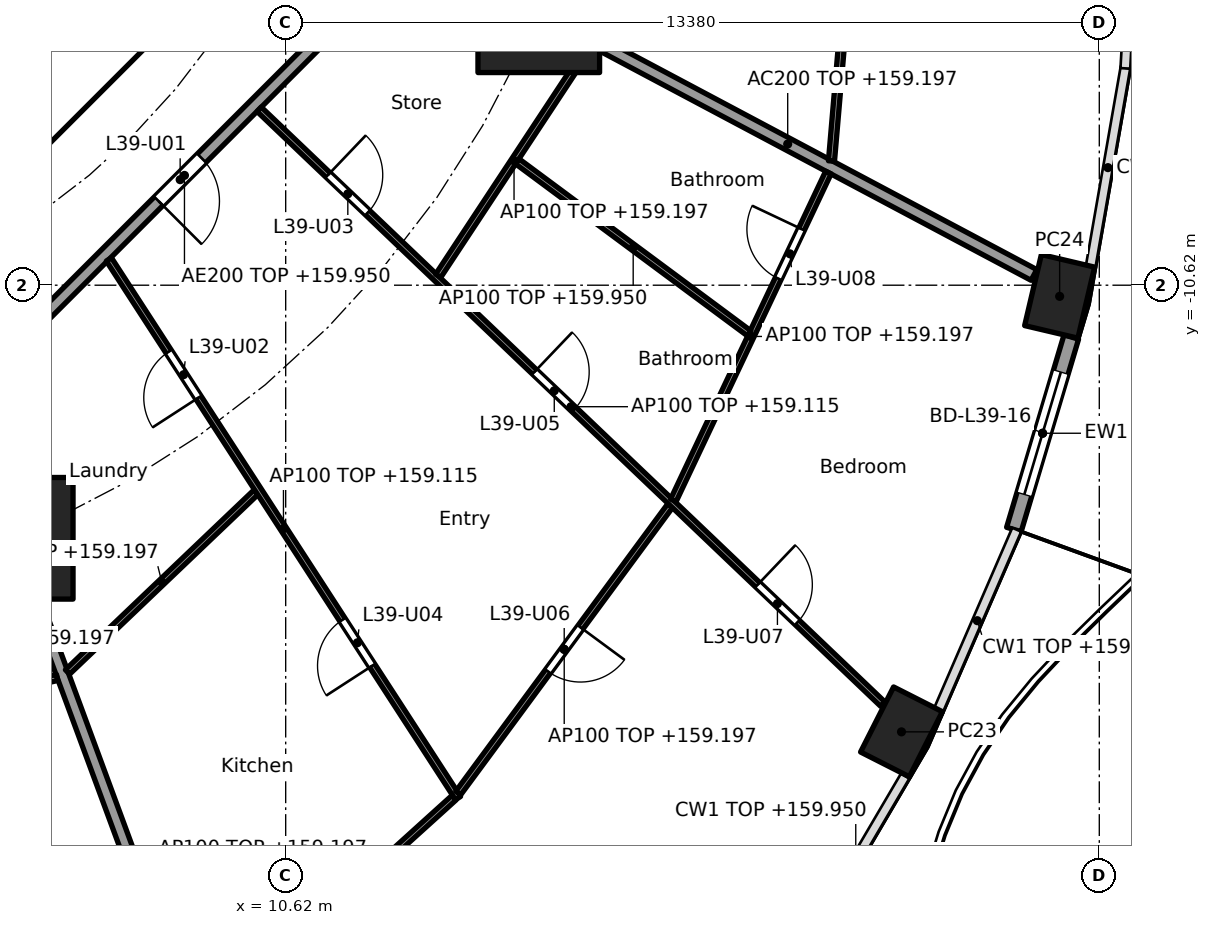
"""IFC4 building model, lengths in metres.
Left out: names, types, materials, properties, quantities, classifications, styles, units other than length and angle.
Written with IfcOpenShell. Run it as: python <this file> out.ifc"""

import sys

from ifc_helpers import new_model, si_unit, direction, frame, frame_2d, origin, origin_2d, place, context, subcontext, project, spatial, rectangle, hollow_rectangle, extrude, element, fill, save


model = new_model("IFC4")
c1 = context("Model", 3, precision=1e-05, world=origin(), true_north=direction((0.0, 1.0)))
c2 = subcontext(c1, "Body", "Model", "MODEL_VIEW")
j1 = project(units=[si_unit("LENGTHUNIT", "METRE"), si_unit("PLANEANGLEUNIT", "RADIAN")], contexts=[c1])
p1 = place(None, origin())
s1 = spatial("IfcSite", under=j1, at=p1, CompositionType="ELEMENT")
p2 = place(p1, origin())
s2 = spatial("IfcBuilding", under=s1, at=p2, CompositionType="ELEMENT")
p3 = place(p2, frame((0.0, 0.0, 156.6)))
s3 = spatial("IfcBuildingStorey", under=s2, at=p3, CompositionType="ELEMENT", Elevation=156.6)
for number, where, z_axis, x_axis in (
    (1, (20.747, -17.965, 0.0), (0.0, 0.0, 1.0), (0.452, 0.892, 0.0)),
    (2, (23.348, -10.803, 0.0), (0.0, 0.0, 1.0), (0.229, 0.973, 0.0)),
):
    element("IfcColumn", number, at=place(p3, frame(where, z_axis=z_axis, x_axis=x_axis)), inside=s3, PredefinedType="COLUMN", context=c2, shape_type="SweptSolid", body=[
        extrude(hollow_rectangle(XDim=1.2, YDim=0.9, WallThickness=0.04, at=origin_2d()), origin(), (0.0, 0.0, 1.0), 3.7),
    ])
for number, where, z_axis, x_axis in (
    (3, (6.123, -14.782, 0.0), (0.0, 0.0, 1.0), (1.0, 0.0, 0.0)),
    (4, (14.782, -6.123, 0.0), (0.0, 0.0, 1.0), (1.0, 0.0, 0.0)),
):
    element("IfcColumn", number, at=place(p3, frame(where, z_axis=z_axis, x_axis=x_axis)), inside=s3, PredefinedType="COLUMN", context=c2, shape_type="SweptSolid", body=[
        extrude(rectangle(XDim=2.0, YDim=2.0, at=origin_2d()), origin(), (0.0, 0.0, 1.0), 3.7),
    ])
p4 = place(p3, frame((23.54, -11.472, 0.0), z_axis=(0.0, 0.0, 1.0), x_axis=(-0.285821792767, -0.958282788523, 0.0)))
e5 = element("IfcWall", 5, at=p4, inside=s3, PredefinedType="SOLIDWALL", context=c2, shape_type="SweptSolid", body=[
    extrude(rectangle(XDim=3.303, YDim=0.25, at=frame_2d((1.651, 0.0))), origin(), (0.0, 0.0, 1.0), 3.35),
])
p5 = place(p4, frame((0.602, 0.0, 0.0)))
e6 = element("IfcOpeningElement", 6, at=p5, cuts=e5, PredefinedType="OPENING", context=c2, shape_type="SweptSolid", body=[
    extrude(rectangle(XDim=2.1, YDim=2.4, at=frame_2d((1.05, 1.2))), frame((0.0, 0.135, 0.0), z_axis=(0.0, -1.0, 0.0), x_axis=(1.0, 0.0, 0.0)), (0.0, 0.0, 1.0), 0.27),
])
p6 = place(p3, frame((4.613, -9.988, 0.0), z_axis=(0.0, 0.0, 1.0), x_axis=(0.707106781187, 0.707106781187, 0.0)))
e7 = element("IfcWall", 7, at=p6, inside=s3, PredefinedType="SHEAR", context=c2, shape_type="SweptSolid", body=[
    extrude(rectangle(XDim=7.602, YDim=0.6, at=frame_2d((3.801, 0.0))), origin(), (0.0, 0.0, 1.0), 3.35),
])
p7 = place(p6, frame((3.201, 0.0, 0.0)))
e8 = element("IfcOpeningElement", 8, at=p7, cuts=e7, PredefinedType="OPENING", context=c2, shape_type="SweptSolid", body=[
    extrude(rectangle(XDim=1.2, YDim=2.1, at=frame_2d((0.6, 1.05))), frame((0.0, 0.31, 0.0), z_axis=(0.0, -1.0, 0.0), x_axis=(1.0, 0.0, 0.0)), (0.0, 0.0, 1.0), 0.62),
])
p8 = place(p3, frame((6.14, -14.829, 0.0), z_axis=(0.0, 0.0, 1.0), x_axis=(0.346169582481, -0.938171956608, 0.0)))
e9 = element("IfcWall", 9, at=p8, inside=s3, PredefinedType="PARTITIONING", context=c2, shape_type="SweptSolid", body=[
    extrude(rectangle(XDim=14.354, YDim=0.2, at=frame_2d((7.177, 0.0))), origin(), (0.0, 0.0, 1.0), 2.597),
])
p9 = place(p3, frame((14.826, -6.146, 0.0), z_axis=(0.0, 0.0, 1.0), x_axis=(0.883012998471, -0.469348532044, 0.0)))
e10 = element("IfcWall", 10, at=p9, inside=s3, PredefinedType="PARTITIONING", context=c2, shape_type="SweptSolid", body=[
    extrude(rectangle(XDim=9.172, YDim=0.2, at=frame_2d((4.586, 0.0))), origin(), (0.0, 0.0, 1.0), 2.597),
])
p10 = place(p3, frame((5.275, -12.494, 0.0), z_axis=(0.0, 0.0, 1.0), x_axis=(0.707106781187, 0.707106781187, 0.0)))
e11 = element("IfcWall", 11, at=p10, inside=s3, PredefinedType="PARTITIONING", context=c2, shape_type="SweptSolid", body=[
    extrude(rectangle(XDim=10.409, YDim=0.2, at=frame_2d((5.205, 0.0))), origin(), (0.0, 0.0, 1.0), 3.35),
])
p11 = place(p10, frame((4.604, 0.0, 0.0)))
e12 = element("IfcOpeningElement", 12, at=p11, cuts=e11, PredefinedType="OPENING", context=c2, shape_type="SweptSolid", body=[
    extrude(rectangle(XDim=1.0, YDim=2.1, at=frame_2d((0.5, 1.05))), frame((0.0, 0.11, 0.0), z_axis=(0.0, -1.0, 0.0), x_axis=(1.0, 0.0, 0.0)), (0.0, 0.0, 1.0), 0.22),
])
p12 = place(p3, frame((20.106, -2.642, 0.0), z_axis=(0.0, 0.0, 1.0), x_axis=(-0.085694058383, -0.996321498492, 0.0)))
e13 = element("IfcWall", 13, at=p12, inside=s3, PredefinedType="PARTITIONING", context=c2, shape_type="SweptSolid", body=[
    extrude(rectangle(XDim=5.957, YDim=0.1, at=frame_2d((2.979, 0.0))), origin(), (0.0, 0.0, 1.0), 2.597),
])
p13 = place(p3, frame((3.219, -17.9, 0.0), z_axis=(0.0, 0.0, 1.0), x_axis=(0.975106528652, 0.22173691118, 0.0)))
e14 = element("IfcWall", 14, at=p13, inside=s3, PredefinedType="PARTITIONING", context=c2, shape_type="SweptSolid", body=[
    extrude(rectangle(XDim=3.736, YDim=0.1, at=frame_2d((1.868, 0.0))), origin(), (0.0, 0.0, 1.0), 2.597),
])
p14 = place(p3, frame((7.032, -16.98, 0.0), z_axis=(0.0, 0.0, 1.0), x_axis=(0.723709759148, 0.690104473622, 0.0)))
e15 = element("IfcWall", 15, at=p14, inside=s3, PredefinedType="PARTITIONING", context=c2, shape_type="SweptSolid", body=[
    extrude(rectangle(XDim=4.286, YDim=0.1, at=frame_2d((2.143, 0.0))), origin(), (0.0, 0.0, 1.0), 2.597),
])
p15 = place(p3, frame((9.195, -22.84, 0.0), z_axis=(0.0, 0.0, 1.0), x_axis=(0.741675855479, 0.670758470241, 0.0)))
e16 = element("IfcWall", 16, at=p15, inside=s3, PredefinedType="PARTITIONING", context=c2, shape_type="SweptSolid", body=[
    extrude(rectangle(XDim=5.656, YDim=0.1, at=frame_2d((2.828, 0.0))), origin(), (0.0, 0.0, 1.0), 2.597),
])
p16 = place(p3, frame((7.712, -10.195, 0.0), z_axis=(0.0, 0.0, 1.0), x_axis=(0.543868615753, -0.839170381269, 0.0)))
e17 = element("IfcWall", 17, at=p16, inside=s3, PredefinedType="PARTITIONING", context=c2, shape_type="SweptSolid", body=[
    extrude(rectangle(XDim=10.558, YDim=0.1, at=frame_2d((5.279, 0.0))), origin(), (0.0, 0.0, 1.0), 2.515),
])
p17 = place(p16, frame((1.81, 0.0, 0.0)))
e18 = element("IfcOpeningElement", 18, at=p17, cuts=e17, PredefinedType="OPENING", context=c2, shape_type="SweptSolid", body=[
    extrude(rectangle(XDim=0.9, YDim=2.1, at=frame_2d((0.45, 1.05))), frame((0.0, 0.06, 0.0), z_axis=(0.0, -1.0, 0.0), x_axis=(1.0, 0.0, 0.0)), (0.0, 0.0, 1.0), 0.12),
])
p18 = place(p16, frame((7.064, 0.0, 0.0)))
e19 = element("IfcOpeningElement", 19, at=p18, cuts=e17, PredefinedType="OPENING", context=c2, shape_type="SweptSolid", body=[
    extrude(rectangle(XDim=0.9, YDim=2.1, at=frame_2d((0.45, 1.05))), frame((0.0, 0.06, 0.0), z_axis=(0.0, -1.0, 0.0), x_axis=(1.0, 0.0, 0.0)), (0.0, 0.0, 1.0), 0.12),
])
p19 = place(p3, frame((13.457, -18.973, 0.0), z_axis=(0.0, 0.0, 1.0), x_axis=(0.593532053206, 0.80481035146, 0.0)))
e20 = element("IfcWall", 20, at=p19, inside=s3, PredefinedType="PARTITIONING", context=c2, shape_type="SweptSolid", body=[
    extrude(rectangle(XDim=5.876, YDim=0.1, at=frame_2d((2.938, 0.0))), origin(), (0.0, 0.0, 1.0), 2.597),
])
p20 = place(p19, frame((2.488, 0.0, 0.0)))
e21 = element("IfcOpeningElement", 21, at=p20, cuts=e20, PredefinedType="OPENING", context=c2, shape_type="SweptSolid", body=[
    extrude(rectangle(XDim=0.9, YDim=2.1, at=frame_2d((0.45, 1.05))), frame((0.0, 0.06, 0.0), z_axis=(0.0, -1.0, 0.0), x_axis=(1.0, 0.0, 0.0)), (0.0, 0.0, 1.0), 0.12),
])
p21 = place(p3, frame((10.184, -7.727, 0.0), z_axis=(0.0, 0.0, 1.0), x_axis=(0.723635100101, -0.690182759783, 0.0)))
e22 = element("IfcWall", 22, at=p21, inside=s3, PredefinedType="PARTITIONING", context=c2, shape_type="SweptSolid", body=[
    extrude(rectangle(XDim=14.173, YDim=0.1, at=frame_2d((7.086, 0.0))), origin(), (0.0, 0.0, 1.0), 2.515),
])
p22 = place(p21, frame((1.565, 0.0, 0.0)))
e23 = element("IfcOpeningElement", 23, at=p22, cuts=e22, PredefinedType="OPENING", context=c2, shape_type="SweptSolid", body=[
    extrude(rectangle(XDim=0.9, YDim=2.1, at=frame_2d((0.45, 1.05))), frame((0.0, 0.06, 0.0), z_axis=(0.0, -1.0, 0.0), x_axis=(1.0, 0.0, 0.0)), (0.0, 0.0, 1.0), 0.12),
])
p23 = place(p21, frame((6.257, 0.0, 0.0)))
e24 = element("IfcOpeningElement", 24, at=p23, cuts=e22, PredefinedType="OPENING", context=c2, shape_type="SweptSolid", body=[
    extrude(rectangle(XDim=0.9, YDim=2.1, at=frame_2d((0.45, 1.05))), frame((0.0, 0.06, 0.0), z_axis=(0.0, -1.0, 0.0), x_axis=(1.0, 0.0, 0.0)), (0.0, 0.0, 1.0), 0.12),
])
p24 = place(p21, frame((11.328, 0.0, 0.0)))
e25 = element("IfcOpeningElement", 25, at=p24, cuts=e22, PredefinedType="OPENING", context=c2, shape_type="SweptSolid", body=[
    extrude(rectangle(XDim=0.9, YDim=2.1, at=frame_2d((0.45, 1.05))), frame((0.0, 0.06, 0.0), z_axis=(0.0, -1.0, 0.0), x_axis=(1.0, 0.0, 0.0)), (0.0, 0.0, 1.0), 0.12),
])
p25 = place(p3, frame((13.127, -10.467, 0.0), z_axis=(0.0, 0.0, 1.0), x_axis=(0.550591551401, 0.83477478611, 0.0)))
e26 = element("IfcWall", 26, at=p25, inside=s3, PredefinedType="PARTITIONING", context=c2, shape_type="SweptSolid", body=[
    extrude(rectangle(XDim=4.532, YDim=0.1, at=frame_2d((2.266, 0.0))), origin(), (0.0, 0.0, 1.0), 2.597),
])
p26 = place(p3, frame((16.995, -14.158, 0.0), z_axis=(0.0, 0.0, 1.0), x_axis=(0.427436809038, 0.904045228005, 0.0)))
e27 = element("IfcWall", 27, at=p26, inside=s3, PredefinedType="PARTITIONING", context=c2, shape_type="SweptSolid", body=[
    extrude(rectangle(XDim=5.963, YDim=0.1, at=frame_2d((2.981, 0.0))), origin(), (0.0, 0.0, 1.0), 2.597),
])
p27 = place(p26, frame((4.035, 0.0, 0.0)))
e28 = element("IfcOpeningElement", 28, at=p27, cuts=e27, PredefinedType="OPENING", context=c2, shape_type="SweptSolid", body=[
    extrude(rectangle(XDim=0.9, YDim=2.1, at=frame_2d((0.45, 1.05))), frame((0.0, 0.06, 0.0), z_axis=(0.0, -1.0, 0.0), x_axis=(1.0, 0.0, 0.0)), (0.0, 0.0, 1.0), 0.12),
])
p28 = place(p3, frame((14.429, -8.583, 0.0), z_axis=(0.0, 0.0, 1.0), x_axis=(0.803162355549, -0.595760212358, 0.0)))
e29 = element("IfcWall", 29, at=p28, inside=s3, PredefinedType="PARTITIONING", context=c2, shape_type="SweptSolid", body=[
    extrude(rectangle(XDim=4.745, YDim=0.1, at=frame_2d((2.373, 0.0))), origin(), (0.0, 0.0, 1.0), 3.35),
])
p29 = place(p5, origin())
e30 = element("IfcDoor", 30, at=p29, inside=s3, OperationType="SLIDING_TO_LEFT", PredefinedType="DOOR", context=c2, shape_type="SweptSolid", body=[
    extrude(rectangle(XDim=2.1, YDim=2.4, at=frame_2d((1.05, 1.2))), frame((0.0, 0.025, 0.0), z_axis=(0.0, -1.0, 0.0), x_axis=(1.0, 0.0, 0.0)), (0.0, 0.0, 1.0), 0.05),
])
fill(e6, e30)
p30 = place(p7, origin())
e31 = element("IfcDoor", 31, at=p30, inside=s3, OperationType="SINGLE_SWING_LEFT", PredefinedType="DOOR", context=c2, shape_type="SweptSolid", body=[
    extrude(rectangle(XDim=1.2, YDim=2.1, at=frame_2d((0.6, 1.05))), frame((0.0, 0.025, 0.0), z_axis=(0.0, -1.0, 0.0), x_axis=(1.0, 0.0, 0.0)), (0.0, 0.0, 1.0), 0.05),
])
fill(e8, e31)
p31 = place(p11, frame((1.0, 0.0, 0.0), x_axis=(-1.0, 0.0, 0.0)))
e32 = element("IfcDoor", 32, at=p31, inside=s3, OperationType="SINGLE_SWING_RIGHT", PredefinedType="DOOR", context=c2, shape_type="SweptSolid", body=[
    extrude(rectangle(XDim=1.0, YDim=2.1, at=frame_2d((0.5, 1.05))), frame((0.0, 0.025, 0.0), z_axis=(0.0, -1.0, 0.0), x_axis=(1.0, 0.0, 0.0)), (0.0, 0.0, 1.0), 0.05),
])
fill(e12, e32)
p32 = place(p17, frame((0.9, 0.0, 0.0), x_axis=(-1.0, 0.0, 0.0)))
e33 = element("IfcDoor", 33, at=p32, inside=s3, OperationType="SINGLE_SWING_LEFT", PredefinedType="DOOR", context=c2, shape_type="SweptSolid", body=[
    extrude(rectangle(XDim=0.9, YDim=2.1, at=frame_2d((0.45, 1.05))), frame((0.0, 0.025, 0.0), z_axis=(0.0, -1.0, 0.0), x_axis=(1.0, 0.0, 0.0)), (0.0, 0.0, 1.0), 0.05),
])
fill(e18, e33)
p33 = place(p22, origin())
e34 = element("IfcDoor", 34, at=p33, inside=s3, OperationType="SINGLE_SWING_LEFT", PredefinedType="DOOR", context=c2, shape_type="SweptSolid", body=[
    extrude(rectangle(XDim=0.9, YDim=2.1, at=frame_2d((0.45, 1.05))), frame((0.0, 0.025, 0.0), z_axis=(0.0, -1.0, 0.0), x_axis=(1.0, 0.0, 0.0)), (0.0, 0.0, 1.0), 0.05),
])
fill(e23, e34)
p34 = place(p18, frame((0.9, 0.0, 0.0), x_axis=(-1.0, 0.0, 0.0)))
e35 = element("IfcDoor", 35, at=p34, inside=s3, OperationType="SINGLE_SWING_LEFT", PredefinedType="DOOR", context=c2, shape_type="SweptSolid", body=[
    extrude(rectangle(XDim=0.9, YDim=2.1, at=frame_2d((0.45, 1.05))), frame((0.0, 0.025, 0.0), z_axis=(0.0, -1.0, 0.0), x_axis=(1.0, 0.0, 0.0)), (0.0, 0.0, 1.0), 0.05),
])
fill(e19, e35)
p35 = place(p23, origin())
e36 = element("IfcDoor", 36, at=p35, inside=s3, OperationType="SINGLE_SWING_LEFT", PredefinedType="DOOR", context=c2, shape_type="SweptSolid", body=[
    extrude(rectangle(XDim=0.9, YDim=2.1, at=frame_2d((0.45, 1.05))), frame((0.0, 0.025, 0.0), z_axis=(0.0, -1.0, 0.0), x_axis=(1.0, 0.0, 0.0)), (0.0, 0.0, 1.0), 0.05),
])
fill(e24, e36)
p36 = place(p20, frame((0.9, 0.0, 0.0), x_axis=(-1.0, 0.0, 0.0)))
e37 = element("IfcDoor", 37, at=p36, inside=s3, OperationType="SINGLE_SWING_LEFT", PredefinedType="DOOR", context=c2, shape_type="SweptSolid", body=[
    extrude(rectangle(XDim=0.9, YDim=2.1, at=frame_2d((0.45, 1.05))), frame((0.0, 0.025, 0.0), z_axis=(0.0, -1.0, 0.0), x_axis=(1.0, 0.0, 0.0)), (0.0, 0.0, 1.0), 0.05),
])
fill(e21, e37)
p37 = place(p24, origin())
e38 = element("IfcDoor", 38, at=p37, inside=s3, OperationType="SINGLE_SWING_LEFT", PredefinedType="DOOR", context=c2, shape_type="SweptSolid", body=[
    extrude(rectangle(XDim=0.9, YDim=2.1, at=frame_2d((0.45, 1.05))), frame((0.0, 0.025, 0.0), z_axis=(0.0, -1.0, 0.0), x_axis=(1.0, 0.0, 0.0)), (0.0, 0.0, 1.0), 0.05),
])
fill(e25, e38)
p38 = place(p27, origin())
e39 = element("IfcDoor", 39, at=p38, inside=s3, OperationType="SINGLE_SWING_RIGHT", PredefinedType="DOOR", context=c2, shape_type="SweptSolid", body=[
    extrude(rectangle(XDim=0.9, YDim=2.1, at=frame_2d((0.45, 1.05))), frame((0.0, 0.025, 0.0), z_axis=(0.0, -1.0, 0.0), x_axis=(1.0, 0.0, 0.0)), (0.0, 0.0, 1.0), 0.05),
])
fill(e28, e39)
save(model, sys.argv[1])
